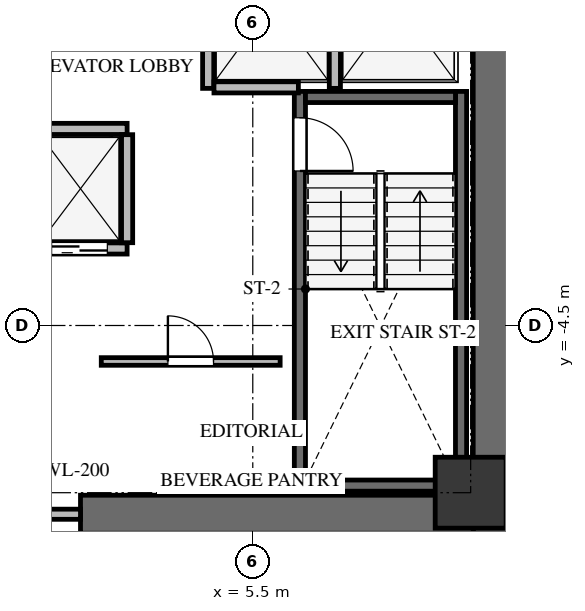
"""IFC4 building model, lengths in metres.
Left out: names, types, materials, properties, quantities, classifications, styles, units other than length and angle.
Written with IfcOpenShell. Run it as: python <this file> out.ifc"""

import sys

from ifc_helpers import new_model, si_unit, direction, frame, frame_2d, origin, origin_2d, place, context, subcontext, project, spatial, rectangle, extrude, source, transform, mapped, element, fill, save


model = new_model("IFC4")
c1 = context("Model", 3, precision=1e-05, world=origin(), true_north=direction((0.0, 1.0)))
c2 = subcontext(c1, "Body", "Model", "MODEL_VIEW")
j1 = project(units=[si_unit("LENGTHUNIT", "METRE"), si_unit("PLANEANGLEUNIT", "RADIAN")], contexts=[c1])
p1 = place(None, origin())
s1 = spatial("IfcSite", under=j1, at=p1, CompositionType="ELEMENT")
p2 = place(p1, origin())
s2 = spatial("IfcBuilding", under=s1, at=p2, CompositionType="ELEMENT")
p3 = place(p2, frame((0.0, 0.0, 143.1)))
s3 = spatial("IfcBuildingStorey", under=s2, at=p3, CompositionType="ELEMENT", Elevation=143.1)
p4 = place(p3, frame((10.225, -8.6, 0.0), z_axis=(0.0, 0.0, 1.0), x_axis=(0.0, 1.0, 0.0)))
e1 = element("IfcWall", 1, at=p4, inside=s3, PredefinedType="SHEAR", context=c2, shape_type="SweptSolid", body=[
    extrude(rectangle(XDim=17.2, YDim=0.75, at=frame_2d((8.6, 0.0))), origin(), (0.0, 0.0, 1.0), 3.0),
])
p5 = place(p3, frame((2.1, -8.225, 0.0), z_axis=(0.0, 0.0, 1.0), x_axis=(1.0, 0.0, 0.0)))
e2 = element("IfcWall", 2, at=p5, inside=s3, PredefinedType="SHEAR", context=c2, shape_type="SweptSolid", body=[
    extrude(rectangle(XDim=7.75, YDim=0.75, at=frame_2d((3.875, 0.0))), origin(), (0.0, 0.0, 1.0), 3.0),
])
p6 = place(p3, frame((9.61, -7.77, -0.24), z_axis=(0.0, 0.0, 1.0), x_axis=(0.0, 1.0, 0.0)))
e3 = element("IfcWall", 3, at=p6, inside=s3, PredefinedType="SHEAR", context=c2, shape_type="SweptSolid", body=[
    extrude(rectangle(XDim=7.89, YDim=0.22, at=frame_2d((3.945, 0.0))), origin(), (0.0, 0.0, 1.0), 3.0),
])
p7 = place(p3, frame((6.43, 0.12, -0.24), z_axis=(0.0, 0.0, 1.0), x_axis=(0.0, -1.0, 0.0)))
e4 = element("IfcWall", 4, at=p7, inside=s3, PredefinedType="SHEAR", context=c2, shape_type="SweptSolid", body=[
    extrude(rectangle(XDim=7.89, YDim=0.22, at=frame_2d((3.945, 0.0))), origin(), (0.0, 0.0, 1.0), 3.0),
])
p8 = place(p7, frame((0.52, 0.0, 0.0)))
e5 = element("IfcOpeningElement", 5, at=p8, cuts=e4, PredefinedType="OPENING", context=c2, shape_type="SweptSolid", body=[
    extrude(rectangle(XDim=1.05, YDim=2.15, at=frame_2d((0.525, 1.075))), frame((0.0, 0.12, 0.0), z_axis=(0.0, -1.0, 0.0), x_axis=(1.0, 0.0, 0.0)), (0.0, 0.0, 1.0), 0.24),
])
for number, where, z_axis, x_axis in (
    (6, (6.54, -7.66, -0.24), (0.0, 0.0, 1.0), (1.0, 0.0, 0.0)),
    (7, (9.5, 0.01, -0.24), (0.0, 0.0, 1.0), (-1.0, 0.0, 0.0)),
):
    element("IfcWall", number, at=place(p3, frame(where, z_axis=z_axis, x_axis=x_axis)), inside=s3, PredefinedType="SHEAR", context=c2, shape_type="SweptSolid", body=[
        extrude(rectangle(XDim=2.96, YDim=0.22, at=frame_2d((1.48, 0.0))), origin(), (0.0, 0.0, 1.0), 3.0),
    ])
m1 = source(origin(), c2, "Body", "SweptSolid", [
    extrude(rectangle(XDim=1.4, YDim=1.4, at=origin_2d()), origin(), (0.0, 0.0, 1.0), 3.0),
])
p9 = place(p3, frame((9.8, -7.8, -0.24), z_axis=(0.0, 0.0, 1.0), x_axis=(1.0, 0.0, 0.0)))
e8 = element("IfcColumn", 8, at=p9, inside=s3, PredefinedType="COLUMN", context=c2, shape_type="MappedRepresentation", body=[
    mapped(m1, transform((0.0, 0.0, 0.0), x_axis=(1.0, 0.0, 0.0), y_axis=(0.0, 1.0, 0.0), z_axis=(0.0, 0.0, 1.0), scale=1.0)),
])
p10 = place(p3, frame((-2.1, -8.225, 0.0), z_axis=(0.0, 0.0, 1.0), x_axis=(1.0, 0.0, 0.0)))
e9 = element("IfcWall", 9, at=p10, inside=s3, PredefinedType="SOLIDWALL", context=c2, shape_type="SweptSolid", body=[
    extrude(rectangle(XDim=4.2, YDim=0.2, at=frame_2d((2.1, 0.0))), origin(), (0.0, 0.0, 1.0), 2.745),
])
p11 = place(p10, frame((1.2, 0.0, 0.0)))
e10 = element("IfcOpeningElement", 10, at=p11, cuts=e9, PredefinedType="OPENING", context=c2, shape_type="SweptSolid", body=[
    extrude(rectangle(XDim=1.8, YDim=2.15, at=frame_2d((0.9, 1.075))), frame((0.0, 0.11, 0.0), z_axis=(0.0, -1.0, 0.0), x_axis=(1.0, 0.0, 0.0)), (0.0, 0.0, 1.0), 0.22),
])
for number, where, z_axis, x_axis in (
    (11, (4.62, 0.18, 0.0), (0.0, 0.0, 1.0), (0.0, 1.0, 0.0)),
    (12, (7.12, 0.18, 0.0), (0.0, 0.0, 1.0), (0.0, 1.0, 0.0)),
):
    element("IfcWall", number, at=place(p3, frame(where, z_axis=z_axis, x_axis=x_axis)), inside=s3, PredefinedType="SOLIDWALL", context=c2, shape_type="SweptSolid", body=[
        extrude(rectangle(XDim=3.186, YDim=0.22, at=frame_2d((1.593, 0.0))), origin(), (0.0, 0.0, 1.0), 2.745),
    ])
p12 = place(p3, frame((4.734, 0.2, 0.0), z_axis=(0.0, 0.0, 1.0), x_axis=(1.0, 0.0, 0.0)))
e13 = element("IfcWall", 13, at=p12, inside=s3, PredefinedType="SOLIDWALL", context=c2, shape_type="SweptSolid", body=[
    extrude(rectangle(XDim=1.666, YDim=0.22, at=frame_2d((0.833, 0.0))), origin(), (0.0, 0.0, 1.0), 2.745),
])
p13 = place(p3, frame((-4.22, -2.98, 0.0), z_axis=(0.0, 0.0, 1.0), x_axis=(1.0, 0.0, 0.0)))
e14 = element("IfcWall", 14, at=p13, inside=s3, PredefinedType="SOLIDWALL", context=c2, shape_type="SweptSolid", body=[
    extrude(rectangle(XDim=7.24, YDim=0.22, at=frame_2d((3.62, 0.0))), origin(), (0.0, 0.0, 1.0), 2.745),
])
p14 = place(p13, frame((0.35, 0.0, 0.0)))
e15 = element("IfcOpeningElement", 15, at=p14, cuts=e14, PredefinedType="OPENING", context=c2, shape_type="SweptSolid", body=[
    extrude(rectangle(XDim=1.1, YDim=2.15, at=frame_2d((0.55, 1.075))), frame((0.0, 0.12, 0.0), z_axis=(0.0, -1.0, 0.0), x_axis=(1.0, 0.0, 0.0)), (0.0, 0.0, 1.0), 0.24),
])
p15 = place(p13, frame((2.15, 0.0, 0.0)))
e16 = element("IfcOpeningElement", 16, at=p15, cuts=e14, PredefinedType="OPENING", context=c2, shape_type="SweptSolid", body=[
    extrude(rectangle(XDim=1.1, YDim=2.15, at=frame_2d((0.55, 1.075))), frame((0.0, 0.12, 0.0), z_axis=(0.0, -1.0, 0.0), x_axis=(1.0, 0.0, 0.0)), (0.0, 0.0, 1.0), 0.24),
])
p16 = place(p13, frame((3.95, 0.0, 0.0)))
e17 = element("IfcOpeningElement", 17, at=p16, cuts=e14, PredefinedType="OPENING", context=c2, shape_type="SweptSolid", body=[
    extrude(rectangle(XDim=1.1, YDim=2.15, at=frame_2d((0.55, 1.075))), frame((0.0, 0.12, 0.0), z_axis=(0.0, -1.0, 0.0), x_axis=(1.0, 0.0, 0.0)), (0.0, 0.0, 1.0), 0.24),
])
p17 = place(p13, frame((5.75, 0.0, 0.0)))
e18 = element("IfcOpeningElement", 18, at=p17, cuts=e14, PredefinedType="OPENING", context=c2, shape_type="SweptSolid", body=[
    extrude(rectangle(XDim=1.1, YDim=2.15, at=frame_2d((0.55, 1.075))), frame((0.0, 0.12, 0.0), z_axis=(0.0, -1.0, 0.0), x_axis=(1.0, 0.0, 0.0)), (0.0, 0.0, 1.0), 0.24),
])
p18 = place(p3, frame((-4.22, -0.62, 0.0), z_axis=(0.0, 0.0, 1.0), x_axis=(1.0, 0.0, 0.0)))
e19 = element("IfcWall", 19, at=p18, inside=s3, PredefinedType="SOLIDWALL", context=c2, shape_type="SweptSolid", body=[
    extrude(rectangle(XDim=7.24, YDim=0.22, at=frame_2d((3.62, 0.0))), origin(), (0.0, 0.0, 1.0), 2.745),
])
p19 = place(p3, frame((3.02, -2.866, 0.0), z_axis=(0.0, 0.0, 1.0), x_axis=(0.0, 1.0, 0.0)))
e20 = element("IfcWall", 20, at=p19, inside=s3, PredefinedType="SOLIDWALL", context=c2, shape_type="SweptSolid", body=[
    extrude(rectangle(XDim=2.132, YDim=0.22, at=frame_2d((1.066, 0.0))), origin(), (0.0, 0.0, 1.0), 2.745),
])
p20 = place(p3, frame((2.51, -5.21, 0.0), z_axis=(0.0, 0.0, 1.0), x_axis=(1.0, 0.0, 0.0)))
e21 = element("IfcWall", 21, at=p20, inside=s3, PredefinedType="PARTITIONING", context=c2, shape_type="SweptSolid", body=[
    extrude(rectangle(XDim=3.53, YDim=0.15, at=frame_2d((1.765, 0.0))), origin(), (0.0, 0.0, 1.0), 2.745),
])
p21 = place(p20, frame((1.315, 0.0, 0.0)))
e22 = element("IfcOpeningElement", 22, at=p21, cuts=e21, PredefinedType="OPENING", context=c2, shape_type="SweptSolid", body=[
    extrude(rectangle(XDim=0.9, YDim=2.05, at=frame_2d((0.45, 1.025))), frame((0.0, 0.085, 0.0), z_axis=(0.0, -1.0, 0.0), x_axis=(1.0, 0.0, 0.0)), (0.0, 0.0, 1.0), 0.17),
])
m2 = source(origin(), c2, "Body", "SweptSolid", [
    extrude(rectangle(XDim=1.05, YDim=2.15, at=frame_2d((0.525, 1.075))), frame((0.0, 0.025, 0.0), z_axis=(0.0, -1.0, 0.0), x_axis=(1.0, 0.0, 0.0)), (0.0, 0.0, 1.0), 0.05),
])
p22 = place(p8, origin())
e23 = element("IfcDoor", 23, at=p22, inside=s3, OperationType="SINGLE_SWING_RIGHT", PredefinedType="DOOR", context=c2, shape_type="MappedRepresentation", body=[
    mapped(m2, transform((0.0, 0.0, 0.0), x_axis=(1.0, 0.0, 0.0), y_axis=(0.0, 1.0, 0.0), z_axis=(0.0, 0.0, 1.0), scale=1.0)),
])
fill(e5, e23)
m3 = source(origin(), c2, "Body", "SweptSolid", [
    extrude(rectangle(XDim=1.1, YDim=2.15, at=frame_2d((0.55, 1.075))), frame((0.0, 0.025, 0.0), z_axis=(0.0, -1.0, 0.0), x_axis=(1.0, 0.0, 0.0)), (0.0, 0.0, 1.0), 0.05),
])
p23 = place(p17, origin())
e24 = element("IfcDoor", 24, at=p23, inside=s3, OperationType="DOUBLE_DOOR_SLIDING", PredefinedType="DOOR", context=c2, shape_type="MappedRepresentation", body=[
    mapped(m3, transform((0.0, 0.0, 0.0), x_axis=(1.0, 0.0, 0.0), y_axis=(0.0, 1.0, 0.0), z_axis=(0.0, 0.0, 1.0), scale=1.0)),
])
fill(e18, e24)
m4 = source(origin(), c2, "Body", "SweptSolid", [
    extrude(rectangle(XDim=0.9, YDim=2.05, at=frame_2d((0.45, 1.025))), frame((0.0, 0.025, 0.0), z_axis=(0.0, -1.0, 0.0), x_axis=(1.0, 0.0, 0.0)), (0.0, 0.0, 1.0), 0.05),
])
p24 = place(p21, origin())
e25 = element("IfcDoor", 25, at=p24, inside=s3, OperationType="SINGLE_SWING_LEFT", PredefinedType="DOOR", context=c2, shape_type="MappedRepresentation", body=[
    mapped(m4, transform((0.0, 0.0, 0.0), x_axis=(1.0, 0.0, 0.0), y_axis=(0.0, 1.0, 0.0), z_axis=(0.0, 0.0, 1.0), scale=1.0)),
])
fill(e22, e25)
save(model, sys.argv[1])
